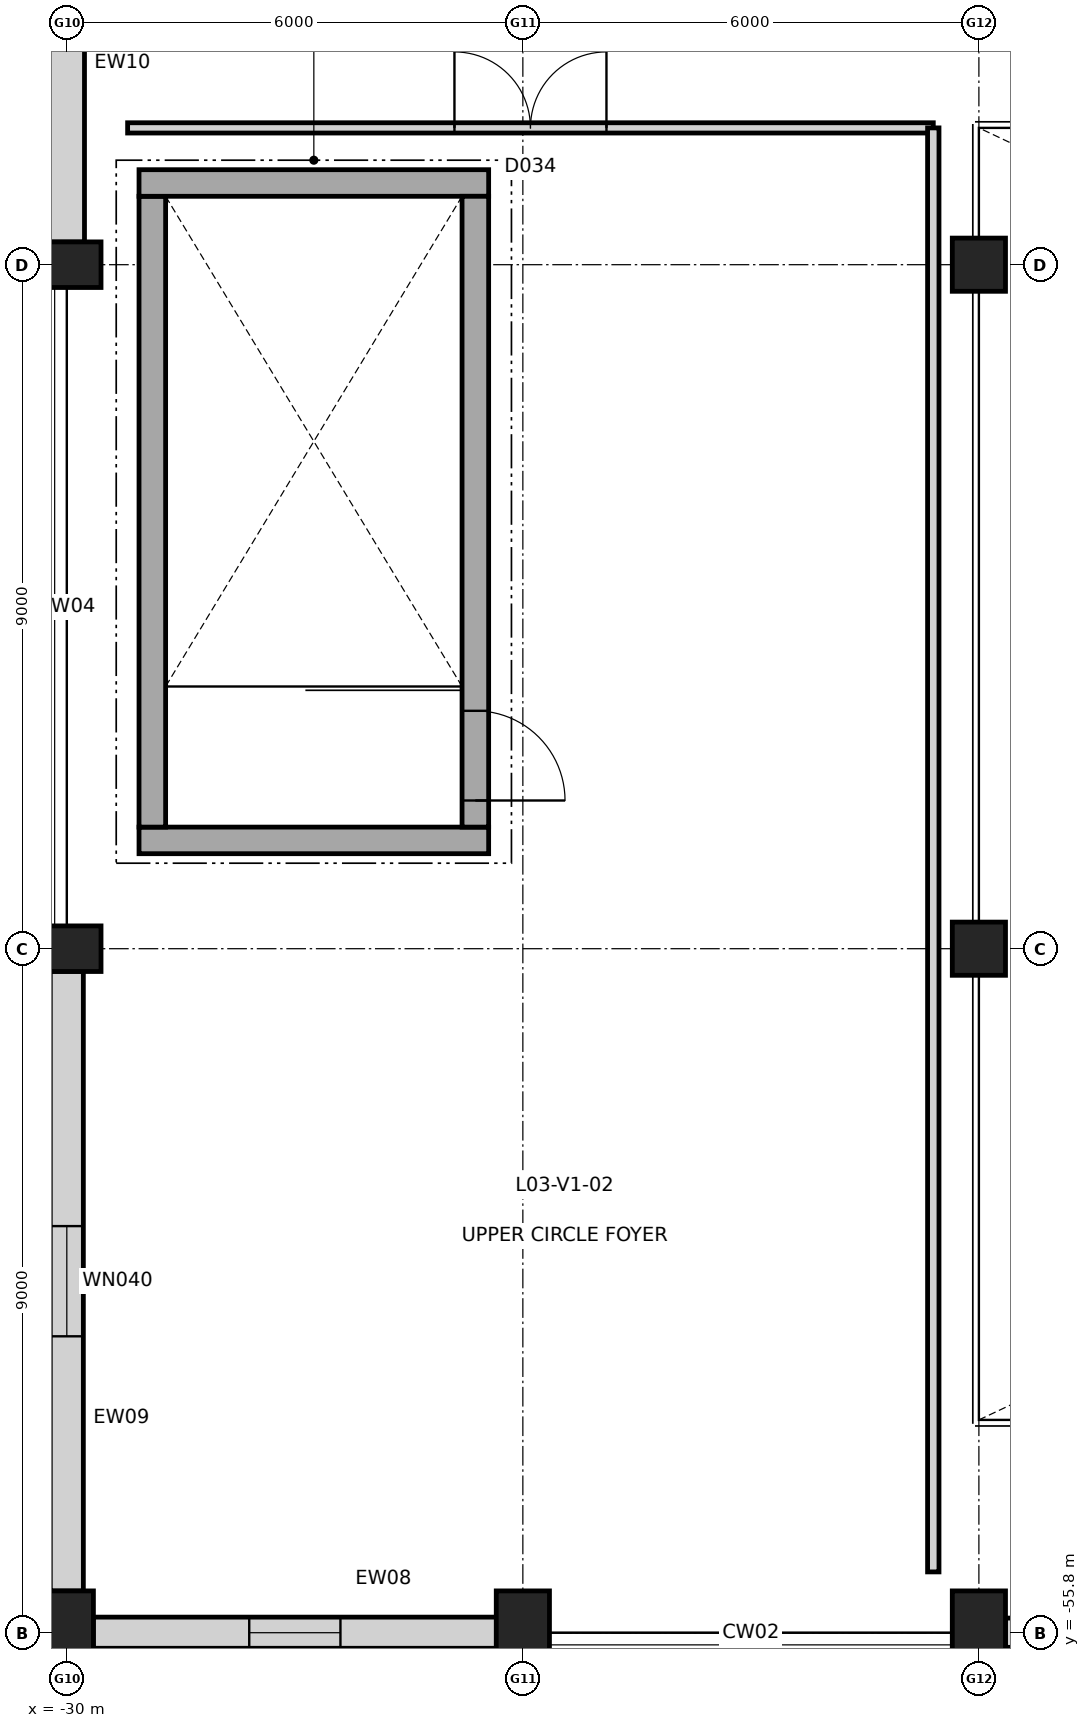
"""IFC4 building model, lengths in metres.
Left out: names, types, materials, properties, quantities, classifications, styles, units other than length and angle.
Written with IfcOpenShell. Run it as: python <this file> out.ifc"""

import sys

from ifc_helpers import new_model, si_unit, direction, frame, frame_2d, origin, origin_2d, place, context, subcontext, project, spatial, rectangle, circle, extrude, element, fill, save


model = new_model("IFC4")
c1 = context("Model", 3, precision=1e-05, world=origin(), true_north=direction((0.0, 1.0)))
c2 = subcontext(c1, "Body", "Model", "MODEL_VIEW")
j1 = project(units=[si_unit("LENGTHUNIT", "METRE"), si_unit("PLANEANGLEUNIT", "RADIAN")], contexts=[c1])
p1 = place(None, origin())
s1 = spatial("IfcSite", under=j1, at=p1, CompositionType="ELEMENT")
p2 = place(p1, origin())
s2 = spatial("IfcBuilding", under=s1, at=p2, CompositionType="ELEMENT")
p3 = place(p2, frame((0.0, 0.0, 15.0)))
s3 = spatial("IfcBuildingStorey", under=s2, at=p3, CompositionType="ELEMENT", Elevation=15.0)
p4 = place(p3, frame((-30.0, -55.8, 0.0), z_axis=(0.0, 0.0, 1.0), x_axis=(1.0, 0.0, 0.0)))
e1 = element("IfcColumn", 1, at=p4, inside=s3, PredefinedType="COLUMN", context=c2, shape_type="SweptSolid", body=[
    extrude(rectangle(XDim=0.7, YDim=1.1, at=origin_2d()), origin(), (0.0, 0.0, 1.0), 4.8),
])
for number, where, z_axis, x_axis in (
    (2, (-30.0, -46.8, 0.0), (0.0, 0.0, 1.0), (0.0, 1.0, 0.0)),
    (3, (-30.0, -37.8, 0.0), (0.0, 0.0, 1.0), (0.0, 1.0, 0.0)),
):
    element("IfcColumn", number, at=place(p3, frame(where, z_axis=z_axis, x_axis=x_axis)), inside=s3, PredefinedType="COLUMN", context=c2, shape_type="SweptSolid", body=[
        extrude(rectangle(XDim=0.6, YDim=0.9, at=origin_2d()), origin(), (0.0, 0.0, 1.0), 4.8),
    ])
for number, where, z_axis, x_axis in (
    (4, (-24.0, -55.8, 0.0), (0.0, 0.0, 1.0), (1.0, 0.0, 0.0)),
    (5, (-18.0, -55.8, 0.0), (0.0, 0.0, 1.0), (1.0, 0.0, 0.0)),
):
    element("IfcColumn", number, at=place(p3, frame(where, z_axis=z_axis, x_axis=x_axis)), inside=s3, PredefinedType="COLUMN", context=c2, shape_type="SweptSolid", body=[
        extrude(rectangle(XDim=0.7, YDim=1.1, at=origin_2d()), origin(), (0.0, 0.0, 1.0), 4.8),
    ])
for number, where, z_axis, x_axis in (
    (6, (-18.0, -46.8, 0.0), (0.0, 0.0, 1.0), (1.0, 0.0, 0.0)),
    (7, (-18.0, -37.8, 0.0), (0.0, 0.0, 1.0), (1.0, 0.0, 0.0)),
):
    element("IfcColumn", number, at=place(p3, frame(where, z_axis=z_axis, x_axis=x_axis)), inside=s3, PredefinedType="COLUMN", context=c2, shape_type="SweptSolid", body=[
        extrude(circle(Radius=0.35, at=origin_2d()), origin(), (0.0, 0.0, 1.0), 4.8),
    ])
p5 = place(p3, frame((-12.348, -55.8, 0.0), z_axis=(0.0, 0.0, 1.0), x_axis=(-1.0, 0.0, 0.0)))
e8 = element("IfcWall", 8, at=p5, inside=s3, PredefinedType="STANDARD", context=c2, shape_type="SweptSolid", body=[
    extrude(rectangle(XDim=5.304, YDim=0.385, at=frame_2d((2.652, 0.0))), origin(), (0.0, 0.0, 1.0), 3.745),
])
p6 = place(p5, frame((1.277, 0.0, 0.85)))
e9 = element("IfcOpeningElement", 9, at=p6, cuts=e8, PredefinedType="OPENING", context=c2, shape_type="SweptSolid", body=[
    extrude(rectangle(XDim=2.75, YDim=1.95, at=frame_2d((1.375, 0.975))), frame((0.0, 0.202, 0.0), z_axis=(0.0, -1.0, 0.0), x_axis=(1.0, 0.0, 0.0)), (0.0, 0.0, 1.0), 0.405),
])
p7 = place(p3, frame((-24.348, -55.8, 0.0), z_axis=(0.0, 0.0, 1.0), x_axis=(-1.0, 0.0, 0.0)))
e10 = element("IfcWall", 10, at=p7, inside=s3, PredefinedType="STANDARD", context=c2, shape_type="SweptSolid", body=[
    extrude(rectangle(XDim=5.304, YDim=0.41, at=frame_2d((2.652, 0.0))), origin(), (0.0, 0.0, 1.0), 3.745),
])
p8 = place(p7, frame((2.052, 0.0, 0.85)))
e11 = element("IfcOpeningElement", 11, at=p8, cuts=e10, PredefinedType="OPENING", context=c2, shape_type="SweptSolid", body=[
    extrude(rectangle(XDim=1.2, YDim=2.1, at=frame_2d((0.6, 1.05))), frame((0.0, 0.215, 0.0), z_axis=(0.0, -1.0, 0.0), x_axis=(1.0, 0.0, 0.0)), (0.0, 0.0, 1.0), 0.43),
])
p9 = place(p3, frame((-30.0, -55.252, 0.0), z_axis=(0.0, 0.0, 1.0), x_axis=(0.0, 1.0, 0.0)))
e12 = element("IfcWall", 12, at=p9, inside=s3, PredefinedType="STANDARD", context=c2, shape_type="SweptSolid", body=[
    extrude(rectangle(XDim=8.154, YDim=0.435, at=frame_2d((4.077, 0.0))), origin(), (0.0, 0.0, 1.0), 3.829),
])
p10 = place(p9, frame((3.352, 0.0, 0.85)))
e13 = element("IfcOpeningElement", 13, at=p10, cuts=e12, PredefinedType="OPENING", context=c2, shape_type="SweptSolid", body=[
    extrude(rectangle(XDim=1.45, YDim=2.1, at=frame_2d((0.725, 1.05))), frame((0.0, 0.228, 0.0), z_axis=(0.0, -1.0, 0.0), x_axis=(1.0, 0.0, 0.0)), (0.0, 0.0, 1.0), 0.455),
])
p11 = place(p3, frame((-30.0, -37.502, 0.0), z_axis=(0.0, 0.0, 1.0), x_axis=(0.0, 1.0, 0.0)))
e14 = element("IfcWall", 14, at=p11, inside=s3, PredefinedType="STANDARD", context=c2, shape_type="SweptSolid", body=[
    extrude(rectangle(XDim=8.404, YDim=0.465, at=frame_2d((4.202, 0.0))), origin(), (0.0, 0.0, 1.0), 3.829),
])
p12 = place(p11, frame((3.377, 0.0, 0.85)))
e15 = element("IfcOpeningElement", 15, at=p12, cuts=e14, PredefinedType="OPENING", context=c2, shape_type="SweptSolid", body=[
    extrude(rectangle(XDim=1.65, YDim=2.1, at=frame_2d((0.825, 1.05))), frame((0.0, 0.242, 0.0), z_axis=(0.0, -1.0, 0.0), x_axis=(1.0, 0.0, 0.0)), (0.0, 0.0, 1.0), 0.485),
])
p13 = place(p3, frame((-24.45, -45.375, 0.0), z_axis=(0.0, 0.0, 1.0), x_axis=(-1.0, 0.0, 0.0)))
e16 = element("IfcWall", 16, at=p13, inside=s3, PredefinedType="SHEAR", context=c2, shape_type="SweptSolid", body=[
    extrude(rectangle(XDim=4.6, YDim=0.35, at=frame_2d((2.3, 0.0))), origin(), (0.0, 0.0, 1.0), 4.8),
])
p14 = place(p3, frame((-28.875, -45.2, 0.0), z_axis=(0.0, 0.0, 1.0), x_axis=(0.0, 1.0, 0.0)))
e17 = element("IfcWall", 17, at=p14, inside=s3, PredefinedType="SHEAR", context=c2, shape_type="SweptSolid", body=[
    extrude(rectangle(XDim=8.3, YDim=0.35, at=frame_2d((4.15, 0.0))), origin(), (0.0, 0.0, 1.0), 4.8),
])
p15 = place(p3, frame((-29.05, -36.725, 0.0), z_axis=(0.0, 0.0, 1.0), x_axis=(1.0, 0.0, 0.0)))
e18 = element("IfcWall", 18, at=p15, inside=s3, PredefinedType="SHEAR", context=c2, shape_type="SweptSolid", body=[
    extrude(rectangle(XDim=4.6, YDim=0.35, at=frame_2d((2.3, 0.0))), origin(), (0.0, 0.0, 1.0), 4.8),
])
p16 = place(p3, frame((-24.625, -36.9, 0.0), z_axis=(0.0, 0.0, 1.0), x_axis=(0.0, -1.0, 0.0)))
e19 = element("IfcWall", 19, at=p16, inside=s3, PredefinedType="SHEAR", context=c2, shape_type="SweptSolid", body=[
    extrude(rectangle(XDim=8.3, YDim=0.35, at=frame_2d((4.15, 0.0))), origin(), (0.0, 0.0, 1.0), 4.8),
])
p17 = place(p16, frame((6.77, 0.0, 0.0)))
e20 = element("IfcOpeningElement", 20, at=p17, cuts=e19, PredefinedType="OPENING", context=c2, shape_type="SweptSolid", body=[
    extrude(rectangle(XDim=1.18, YDim=2.15, at=frame_2d((0.59, 1.075))), frame((0.0, 0.185, 0.0), z_axis=(0.0, -1.0, 0.0), x_axis=(1.0, 0.0, 0.0)), (0.0, 0.0, 1.0), 0.37),
])
p18 = place(p3, frame((-29.2, -36.0, 0.0), z_axis=(0.0, 0.0, 1.0), x_axis=(1.0, 0.0, 0.0)))
e21 = element("IfcWall", 21, at=p18, inside=s3, PredefinedType="PARTITIONING", context=c2, shape_type="SweptSolid", body=[
    extrude(rectangle(XDim=10.6, YDim=0.135, at=frame_2d((5.3, 0.0))), origin(), (0.0, 0.0, 1.0), 4.42),
])
p19 = place(p18, frame((4.3, 0.0, 0.0)))
e22 = element("IfcOpeningElement", 22, at=p19, cuts=e21, PredefinedType="OPENING", context=c2, shape_type="SweptSolid", body=[
    extrude(rectangle(XDim=2.0, YDim=2.35, at=frame_2d((1.0, 1.175))), frame((0.0, 0.077, 0.0), z_axis=(0.0, -1.0, 0.0), x_axis=(1.0, 0.0, 0.0)), (0.0, 0.0, 1.0), 0.155),
])
p20 = place(p3, frame((-18.6, -55.0, 0.0), z_axis=(0.0, 0.0, 1.0), x_axis=(0.0, 1.0, 0.0)))
e23 = element("IfcWall", 23, at=p20, inside=s3, PredefinedType="PARTITIONING", context=c2, shape_type="SweptSolid", body=[
    extrude(rectangle(XDim=19.0, YDim=0.15, at=frame_2d((9.5, 0.0))), origin(), (0.0, 0.0, 1.0), 4.42),
])
p21 = place(p8, origin())
e24 = element("IfcWindow", 24, at=p21, inside=s3, PartitioningType="SINGLE_PANEL", PredefinedType="WINDOW", context=c2, shape_type="SweptSolid", body=[
    extrude(rectangle(XDim=1.2, YDim=2.1, at=frame_2d((0.6, 1.05))), frame((0.0, 0.03, 0.0), z_axis=(0.0, -1.0, 0.0), x_axis=(1.0, 0.0, 0.0)), (0.0, 0.0, 1.0), 0.06),
])
fill(e11, e24)
p22 = place(p10, origin())
e25 = element("IfcWindow", 25, at=p22, inside=s3, PartitioningType="SINGLE_PANEL", PredefinedType="WINDOW", context=c2, shape_type="SweptSolid", body=[
    extrude(rectangle(XDim=1.45, YDim=2.1, at=frame_2d((0.725, 1.05))), frame((0.0, 0.03, 0.0), z_axis=(0.0, -1.0, 0.0), x_axis=(1.0, 0.0, 0.0)), (0.0, 0.0, 1.0), 0.06),
])
fill(e13, e25)
p23 = place(p17, origin())
e26 = element("IfcDoor", 26, at=p23, inside=s3, OperationType="SINGLE_SWING_RIGHT", PredefinedType="DOOR", context=c2, shape_type="SweptSolid", body=[
    extrude(rectangle(XDim=1.18, YDim=2.15, at=frame_2d((0.59, 1.075))), frame((0.0, 0.025, 0.0), z_axis=(0.0, -1.0, 0.0), x_axis=(1.0, 0.0, 0.0)), (0.0, 0.0, 1.0), 0.05),
])
fill(e20, e26)
p24 = place(p19, origin())
e27 = element("IfcDoor", 27, at=p24, inside=s3, OperationType="DOUBLE_DOOR_SINGLE_SWING", PredefinedType="DOOR", context=c2, shape_type="SweptSolid", body=[
    extrude(rectangle(XDim=2.0, YDim=2.35, at=frame_2d((1.0, 1.175))), frame((0.0, 0.025, 0.0), z_axis=(0.0, -1.0, 0.0), x_axis=(1.0, 0.0, 0.0)), (0.0, 0.0, 1.0), 0.05),
])
fill(e22, e27)
save(model, sys.argv[1])
